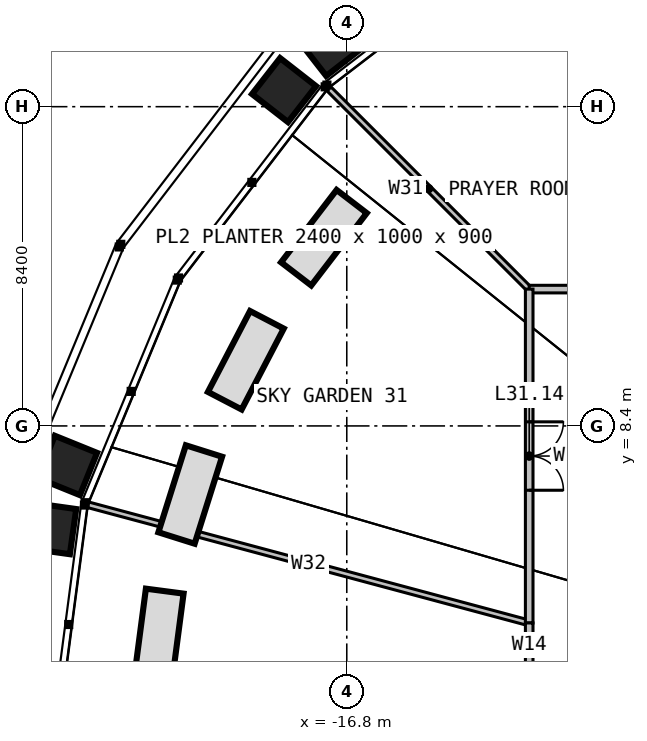
"""IFC4 building model, lengths in metres.
Left out: names, types, materials, properties, quantities, classifications, styles, units other than length and angle.
Written with IfcOpenShell. Run it as: python <this file> out.ifc"""

import sys

from ifc_helpers import new_model, si_unit, direction, frame, frame_2d, origin, place, context, subcontext, project, spatial, rectangle, extrude, element, fill, save


model = new_model("IFC4")
c1 = context("Model", 3, precision=1e-05, world=origin(), true_north=direction((0.0, 1.0)))
c2 = subcontext(c1, "Body", "Model", "MODEL_VIEW")
j1 = project(units=[si_unit("LENGTHUNIT", "METRE"), si_unit("PLANEANGLEUNIT", "RADIAN")], contexts=[c1])
p1 = place(None, origin())
s1 = spatial("IfcSite", under=j1, at=p1, CompositionType="ELEMENT")
p2 = place(p1, origin())
s2 = spatial("IfcBuilding", under=s1, at=p2, CompositionType="ELEMENT")
p3 = place(p2, frame((0.0, 0.0, 130.0)))
s3 = spatial("IfcBuildingStorey", under=s2, at=p3, CompositionType="ELEMENT", Elevation=130.0)
p4 = place(p3, frame((-6.928, 12.0, 0.0), z_axis=(0.0, 0.0, 1.0), x_axis=(-0.500003251404, 0.866023526577, 0.0)))
e1 = element("IfcWall", 1, at=p4, inside=s3, PredefinedType="PARTITIONING", context=c2, shape_type="SweptSolid", body=[
    extrude(rectangle(XDim=10.587, YDim=0.15, at=frame_2d((5.293, 0.0))), origin(), (0.0, 0.0, 1.0), 2.79),
])
p5 = place(p3, frame((-12.0, 12.0, 0.0), z_axis=(0.0, 0.0, 1.0), x_axis=(-0.707106781187, 0.707106781187, 0.0)))
e2 = element("IfcWall", 2, at=p5, inside=s3, PredefinedType="PARTITIONING", context=c2, shape_type="SweptSolid", body=[
    extrude(rectangle(XDim=7.473, YDim=0.15, at=frame_2d((3.736, 0.0))), origin(), (0.0, 0.0, 1.0), 2.79),
])
p6 = place(p3, frame((-12.0, 3.215, 0.0), z_axis=(0.0, 0.0, 1.0), x_axis=(-0.965923753467, 0.258826780857, 0.0)))
e3 = element("IfcWall", 3, at=p6, inside=s3, PredefinedType="PARTITIONING", context=c2, shape_type="SweptSolid", body=[
    extrude(rectangle(XDim=12.02, YDim=0.15, at=frame_2d((6.01, 0.0))), origin(), (0.0, 0.0, 1.0), 2.79),
])
p7 = place(p3, frame((-6.928, 12.0, 0.0), z_axis=(0.0, 0.0, 1.0), x_axis=(-1.0, 0.0, 0.0)))
e4 = element("IfcWall", 4, at=p7, inside=s3, PredefinedType="PARTITIONING", context=c2, shape_type="SweptSolid", body=[
    extrude(rectangle(XDim=5.072, YDim=0.2, at=frame_2d((2.536, 0.0))), origin(), (0.0, 0.0, 1.0), 3.8),
])
p8 = place(p7, frame((2.036, 0.0, 0.0)))
e5 = element("IfcOpeningElement", 5, at=p8, cuts=e4, PredefinedType="OPENING", context=c2, shape_type="SweptSolid", body=[
    extrude(rectangle(XDim=1.0, YDim=2.2, at=frame_2d((0.5, 1.1))), frame((0.0, 0.11, 0.0), z_axis=(0.0, -1.0, 0.0), x_axis=(1.0, 0.0, 0.0)), (0.0, 0.0, 1.0), 0.22),
])
p9 = place(p3, frame((-12.0, 12.0, 0.0), z_axis=(0.0, 0.0, 1.0), x_axis=(0.0, -1.0, 0.0)))
e6 = element("IfcWall", 6, at=p9, inside=s3, PredefinedType="PARTITIONING", context=c2, shape_type="SweptSolid", body=[
    extrude(rectangle(XDim=8.785, YDim=0.2, at=frame_2d((4.392, 0.0))), origin(), (0.0, 0.0, 1.0), 3.2),
])
p10 = place(p9, frame((3.492, 0.0, 0.0)))
e7 = element("IfcOpeningElement", 7, at=p10, cuts=e6, PredefinedType="OPENING", context=c2, shape_type="SweptSolid", body=[
    extrude(rectangle(XDim=1.8, YDim=2.2, at=frame_2d((0.9, 1.1))), frame((0.0, 0.11, 0.0), z_axis=(0.0, -1.0, 0.0), x_axis=(1.0, 0.0, 0.0)), (0.0, 0.0, 1.0), 0.22),
])
p11 = place(p3, frame((-12.0, 3.215, 0.0), z_axis=(0.0, 0.0, 1.0), x_axis=(0.0, -1.0, 0.0)))
e8 = element("IfcWall", 8, at=p11, inside=s3, PredefinedType="PARTITIONING", context=c2, shape_type="SweptSolid", body=[
    extrude(rectangle(XDim=1.146, YDim=0.2, at=frame_2d((0.573, 0.0))), origin(), (0.0, 0.0, 1.0), 3.2),
])
p12 = place(p10, origin())
e9 = element("IfcDoor", 9, at=p12, inside=s3, OperationType="DOUBLE_DOOR_SINGLE_SWING", PredefinedType="DOOR", context=c2, shape_type="SweptSolid", body=[
    extrude(rectangle(XDim=1.8, YDim=2.2, at=frame_2d((0.9, 1.1))), frame((0.0, 0.025, 0.0), z_axis=(0.0, -1.0, 0.0), x_axis=(1.0, 0.0, 0.0)), (0.0, 0.0, 1.0), 0.05),
])
fill(e7, e9)
save(model, sys.argv[1])
